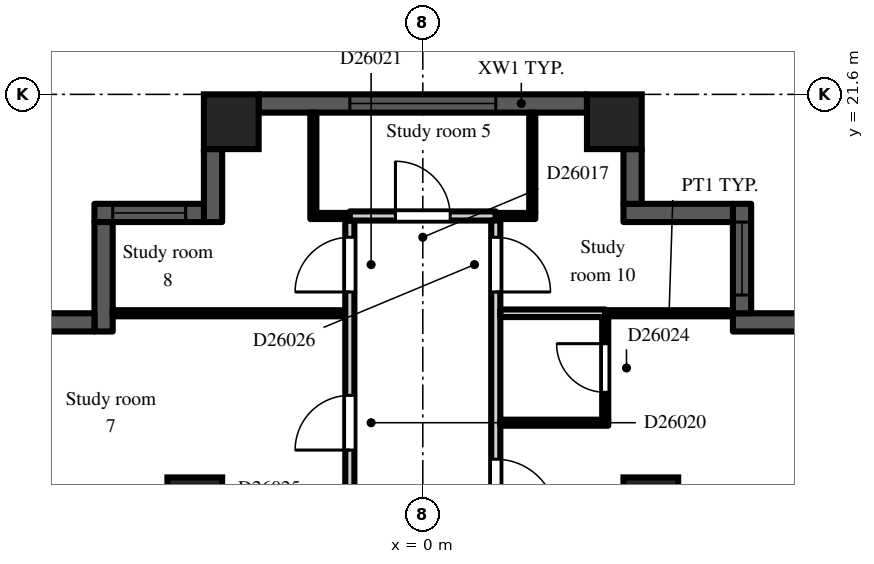
"""IFC4 building model, lengths in metres.
Left out: names, types, materials, properties, quantities, classifications, styles, units other than length and angle.
Written with IfcOpenShell. Run it as: python <this file> out.ifc"""

import sys

from ifc_helpers import new_model, si_unit, direction, frame, frame_2d, origin, origin_2d, place, context, subcontext, project, spatial, rectangle, extrude, element, fill, save


model = new_model("IFC4")
c1 = context("Model", 3, precision=1e-05, world=origin(), true_north=direction((0.0, 1.0)))
c2 = subcontext(c1, "Body", "Model", "MODEL_VIEW")
j1 = project(units=[si_unit("LENGTHUNIT", "METRE"), si_unit("PLANEANGLEUNIT", "RADIAN")], contexts=[c1])
p1 = place(None, origin())
s1 = spatial("IfcSite", under=j1, at=p1, CompositionType="ELEMENT")
p2 = place(p1, origin())
s2 = spatial("IfcBuilding", under=s1, at=p2, CompositionType="ELEMENT")
p3 = place(p2, frame((0.0, 0.0, 179.7)))
s3 = spatial("IfcBuildingStorey", under=s2, at=p3, CompositionType="ELEMENT", Elevation=179.7)
for number, where, z_axis, x_axis in (
    (1, (-3.75, 14.85, 0.0), (0.0, 0.0, 1.0), (1.0, 0.0, 0.0)),
    (2, (-3.15, 21.15, 0.0), (0.0, 0.0, 1.0), (1.0, 0.0, 0.0)),
    (3, (3.15, 21.15, 0.0), (0.0, 0.0, 1.0), (1.0, 0.0, 0.0)),
    (4, (3.75, 14.85, 0.0), (0.0, 0.0, 1.0), (1.0, 0.0, 0.0)),
):
    element("IfcColumn", number, at=place(p3, frame(where, z_axis=z_axis, x_axis=x_axis)), inside=s3, PredefinedType="COLUMN", context=c2, shape_type="SweptSolid", body=[
        extrude(rectangle(XDim=0.9, YDim=0.9, at=origin_2d()), origin(), (0.0, 0.0, 1.0), 3.0),
    ])
p4 = place(p3, frame((6.3, 17.85, 0.0), z_axis=(0.0, 0.0, 1.0), x_axis=(-1.0, 0.0, 0.0)))
e5 = element("IfcWall", 5, at=p4, inside=s3, PredefinedType="SOLIDWALL", context=c2, shape_type="SweptSolid", body=[
    extrude(rectangle(XDim=1.2, YDim=0.3, at=frame_2d((0.6, 0.0))), origin(), (0.0, 0.0, 1.0), 2.6),
])
p5 = place(p3, frame((5.25, 18.0, 0.0), z_axis=(0.0, 0.0, 1.0), x_axis=(0.0, 1.0, 0.0)))
e6 = element("IfcWall", 6, at=p5, inside=s3, PredefinedType="SOLIDWALL", context=c2, shape_type="SweptSolid", body=[
    extrude(rectangle(XDim=1.8, YDim=0.3, at=frame_2d((0.9, 0.0))), origin(), (0.0, 0.0, 1.0), 2.6),
])
p6 = place(p5, frame((0.3, 0.0, 0.2)))
e7 = element("IfcOpeningElement", 7, at=p6, cuts=e6, PredefinedType="OPENING", context=c2, shape_type="SweptSolid", body=[
    extrude(rectangle(XDim=1.2, YDim=1.85, at=frame_2d((0.6, 0.925))), frame((0.0, 0.16, 0.0), z_axis=(0.0, -1.0, 0.0), x_axis=(1.0, 0.0, 0.0)), (0.0, 0.0, 1.0), 0.32),
])
p7 = place(p3, frame((5.1, 19.65, 0.0), z_axis=(0.0, 0.0, 1.0), x_axis=(-1.0, 0.0, 0.0)))
e8 = element("IfcWall", 8, at=p7, inside=s3, PredefinedType="SOLIDWALL", context=c2, shape_type="SweptSolid", body=[
    extrude(rectangle(XDim=1.8, YDim=0.3, at=frame_2d((0.9, 0.0))), origin(), (0.0, 0.0, 1.0), 2.6),
])
p8 = place(p3, frame((3.45, 19.8, 0.0), z_axis=(0.0, 0.0, 1.0), x_axis=(0.0, 1.0, 0.0)))
e9 = element("IfcWall", 9, at=p8, inside=s3, PredefinedType="SOLIDWALL", context=c2, shape_type="SweptSolid", body=[
    extrude(rectangle(XDim=0.9, YDim=0.3, at=frame_2d((0.45, 0.0))), origin(), (0.0, 0.0, 1.0), 2.6),
])
p9 = place(p3, frame((2.7, 21.45, 0.0), z_axis=(0.0, 0.0, 1.0), x_axis=(-1.0, 0.0, 0.0)))
e10 = element("IfcWall", 10, at=p9, inside=s3, PredefinedType="SOLIDWALL", context=c2, shape_type="SweptSolid", body=[
    extrude(rectangle(XDim=5.4, YDim=0.3, at=frame_2d((2.7, 0.0))), origin(), (0.0, 0.0, 1.0), 2.2),
])
p10 = place(p9, frame((1.5, 0.0, 0.2)))
e11 = element("IfcOpeningElement", 11, at=p10, cuts=e10, PredefinedType="OPENING", context=c2, shape_type="SweptSolid", body=[
    extrude(rectangle(XDim=2.4, YDim=1.85, at=frame_2d((1.2, 0.925))), frame((0.0, 0.16, 0.0), z_axis=(0.0, -1.0, 0.0), x_axis=(1.0, 0.0, 0.0)), (0.0, 0.0, 1.0), 0.32),
])
p11 = place(p3, frame((-3.45, 20.7, 0.0), z_axis=(0.0, 0.0, 1.0), x_axis=(0.0, -1.0, 0.0)))
e12 = element("IfcWall", 12, at=p11, inside=s3, PredefinedType="SOLIDWALL", context=c2, shape_type="SweptSolid", body=[
    extrude(rectangle(XDim=1.2, YDim=0.3, at=frame_2d((0.6, 0.0))), origin(), (0.0, 0.0, 1.0), 2.6),
])
p12 = place(p3, frame((-3.6, 19.65, 0.0), z_axis=(0.0, 0.0, 1.0), x_axis=(-1.0, 0.0, 0.0)))
e13 = element("IfcWall", 13, at=p12, inside=s3, PredefinedType="SOLIDWALL", context=c2, shape_type="SweptSolid", body=[
    extrude(rectangle(XDim=1.8, YDim=0.3, at=frame_2d((0.9, 0.0))), origin(), (0.0, 0.0, 1.0), 2.6),
])
p13 = place(p12, frame((0.3, 0.0, 0.2)))
e14 = element("IfcOpeningElement", 14, at=p13, cuts=e13, PredefinedType="OPENING", context=c2, shape_type="SweptSolid", body=[
    extrude(rectangle(XDim=1.2, YDim=1.85, at=frame_2d((0.6, 0.925))), frame((0.0, 0.16, 0.0), z_axis=(0.0, -1.0, 0.0), x_axis=(1.0, 0.0, 0.0)), (0.0, 0.0, 1.0), 0.32),
])
p14 = place(p3, frame((-5.25, 19.5, 0.0), z_axis=(0.0, 0.0, 1.0), x_axis=(0.0, -1.0, 0.0)))
e15 = element("IfcWall", 15, at=p14, inside=s3, PredefinedType="SOLIDWALL", context=c2, shape_type="SweptSolid", body=[
    extrude(rectangle(XDim=1.8, YDim=0.3, at=frame_2d((0.9, 0.0))), origin(), (0.0, 0.0, 1.0), 2.6),
])
p15 = place(p3, frame((-5.4, 17.85, 0.0), z_axis=(0.0, 0.0, 1.0), x_axis=(-1.0, 0.0, 0.0)))
e16 = element("IfcWall", 16, at=p15, inside=s3, PredefinedType="SOLIDWALL", context=c2, shape_type="SweptSolid", body=[
    extrude(rectangle(XDim=0.9, YDim=0.3, at=frame_2d((0.45, 0.0))), origin(), (0.0, 0.0, 1.0), 2.6),
])
p16 = place(p3, frame((-5.1, 18.0, 0.0), z_axis=(0.0, 0.0, 1.0), x_axis=(1.0, 0.0, 0.0)))
e17 = element("IfcWall", 17, at=p16, inside=s3, PredefinedType="PARTITIONING", context=c2, shape_type="SweptSolid", body=[
    extrude(rectangle(XDim=3.825, YDim=0.1, at=frame_2d((1.913, 0.0))), origin(), (0.0, 0.0, 1.0), 2.6),
])
p17 = place(p3, frame((-1.8, 19.55, 0.0), z_axis=(0.0, 0.0, 1.0), x_axis=(0.0, 1.0, 0.0)))
e18 = element("IfcWall", 18, at=p17, inside=s3, PredefinedType="PARTITIONING", context=c2, shape_type="SweptSolid", body=[
    extrude(rectangle(XDim=1.75, YDim=0.1, at=frame_2d((0.875, 0.0))), origin(), (0.0, 0.0, 1.0), 2.6),
])
p18 = place(p3, frame((-1.75, 19.6, 0.0), z_axis=(0.0, 0.0, 1.0), x_axis=(1.0, 0.0, 0.0)))
e19 = element("IfcWall", 19, at=p18, inside=s3, PredefinedType="PARTITIONING", context=c2, shape_type="SweptSolid", body=[
    extrude(rectangle(XDim=0.55, YDim=0.1, at=frame_2d((0.275, 0.0))), origin(), (0.0, 0.0, 1.0), 2.6),
])
p19 = place(p3, frame((-1.2, 1.275, 0.0), z_axis=(0.0, 0.0, 1.0), x_axis=(0.0, 1.0, 0.0)))
e20 = element("IfcWall", 20, at=p19, inside=s3, PredefinedType="PARTITIONING", context=c2, shape_type="SweptSolid", body=[
    extrude(rectangle(XDim=18.25, YDim=0.15, at=frame_2d((9.125, 0.0))), origin(), (0.0, 0.0, 1.0), 2.6),
])
p20 = place(p19, frame((2.475, 0.0, 0.0)))
e21 = element("IfcOpeningElement", 21, at=p20, cuts=e20, PredefinedType="OPENING", context=c2, shape_type="SweptSolid", body=[
    extrude(rectangle(XDim=0.9, YDim=2.1, at=frame_2d((0.45, 1.05))), frame((0.0, 0.085, 0.0), z_axis=(0.0, -1.0, 0.0), x_axis=(1.0, 0.0, 0.0)), (0.0, 0.0, 1.0), 0.17),
])
p21 = place(p19, frame((11.275, 0.0, 0.0)))
e22 = element("IfcOpeningElement", 22, at=p21, cuts=e20, PredefinedType="OPENING", context=c2, shape_type="SweptSolid", body=[
    extrude(rectangle(XDim=0.9, YDim=2.1, at=frame_2d((0.45, 1.05))), frame((0.0, 0.085, 0.0), z_axis=(0.0, -1.0, 0.0), x_axis=(1.0, 0.0, 0.0)), (0.0, 0.0, 1.0), 0.17),
])
p22 = place(p19, frame((7.675, 0.0, 0.0)))
e23 = element("IfcOpeningElement", 23, at=p22, cuts=e20, PredefinedType="OPENING", context=c2, shape_type="SweptSolid", body=[
    extrude(rectangle(XDim=0.9, YDim=2.1, at=frame_2d((0.45, 1.05))), frame((0.0, 0.085, 0.0), z_axis=(0.0, -1.0, 0.0), x_axis=(1.0, 0.0, 0.0)), (0.0, 0.0, 1.0), 0.17),
])
p23 = place(p19, frame((14.475, 0.0, 0.0)))
e24 = element("IfcOpeningElement", 24, at=p23, cuts=e20, PredefinedType="OPENING", context=c2, shape_type="SweptSolid", body=[
    extrude(rectangle(XDim=0.9, YDim=2.1, at=frame_2d((0.45, 1.05))), frame((0.0, 0.085, 0.0), z_axis=(0.0, -1.0, 0.0), x_axis=(1.0, 0.0, 0.0)), (0.0, 0.0, 1.0), 0.17),
])
p24 = place(p19, frame((17.075, 0.0, 0.0)))
e25 = element("IfcOpeningElement", 25, at=p24, cuts=e20, PredefinedType="OPENING", context=c2, shape_type="SweptSolid", body=[
    extrude(rectangle(XDim=0.9, YDim=2.1, at=frame_2d((0.45, 1.05))), frame((0.0, 0.085, 0.0), z_axis=(0.0, -1.0, 0.0), x_axis=(1.0, 0.0, 0.0)), (0.0, 0.0, 1.0), 0.17),
])
p25 = place(p3, frame((-1.2, 19.6, 0.0), z_axis=(0.0, 0.0, 1.0), x_axis=(1.0, 0.0, 0.0)))
e26 = element("IfcWall", 26, at=p25, inside=s3, PredefinedType="PARTITIONING", context=c2, shape_type="SweptSolid", body=[
    extrude(rectangle(XDim=2.4, YDim=0.15, at=frame_2d((1.2, 0.0))), origin(), (0.0, 0.0, 1.0), 2.6),
])
p26 = place(p25, frame((0.75, 0.0, 0.0)))
e27 = element("IfcOpeningElement", 27, at=p26, cuts=e26, PredefinedType="OPENING", context=c2, shape_type="SweptSolid", body=[
    extrude(rectangle(XDim=0.9, YDim=2.1, at=frame_2d((0.45, 1.05))), frame((0.0, 0.085, 0.0), z_axis=(0.0, -1.0, 0.0), x_axis=(1.0, 0.0, 0.0)), (0.0, 0.0, 1.0), 0.17),
])
p27 = place(p3, frame((1.2, 1.125, 0.0), z_axis=(0.0, 0.0, 1.0), x_axis=(0.0, 1.0, 0.0)))
e28 = element("IfcWall", 28, at=p27, inside=s3, PredefinedType="PARTITIONING", context=c2, shape_type="SweptSolid", body=[
    extrude(rectangle(XDim=18.4, YDim=0.15, at=frame_2d((9.2, 0.0))), origin(), (0.0, 0.0, 1.0), 2.6),
])
p28 = place(p27, frame((3.825, 0.0, 0.0)))
e29 = element("IfcOpeningElement", 29, at=p28, cuts=e28, PredefinedType="OPENING", context=c2, shape_type="SweptSolid", body=[
    extrude(rectangle(XDim=0.9, YDim=2.1, at=frame_2d((0.45, 1.05))), frame((0.0, 0.085, 0.0), z_axis=(0.0, -1.0, 0.0), x_axis=(1.0, 0.0, 0.0)), (0.0, 0.0, 1.0), 0.17),
])
p29 = place(p27, frame((11.425, 0.0, 0.0)))
e30 = element("IfcOpeningElement", 30, at=p29, cuts=e28, PredefinedType="OPENING", context=c2, shape_type="SweptSolid", body=[
    extrude(rectangle(XDim=0.9, YDim=2.1, at=frame_2d((0.45, 1.05))), frame((0.0, 0.085, 0.0), z_axis=(0.0, -1.0, 0.0), x_axis=(1.0, 0.0, 0.0)), (0.0, 0.0, 1.0), 0.17),
])
p30 = place(p27, frame((7.825, 0.0, 0.0)))
e31 = element("IfcOpeningElement", 31, at=p30, cuts=e28, PredefinedType="OPENING", context=c2, shape_type="SweptSolid", body=[
    extrude(rectangle(XDim=0.9, YDim=2.1, at=frame_2d((0.45, 1.05))), frame((0.0, 0.085, 0.0), z_axis=(0.0, -1.0, 0.0), x_axis=(1.0, 0.0, 0.0)), (0.0, 0.0, 1.0), 0.17),
])
p31 = place(p27, frame((13.475, 0.0, 0.0)))
e32 = element("IfcOpeningElement", 32, at=p31, cuts=e28, PredefinedType="OPENING", context=c2, shape_type="SweptSolid", body=[
    extrude(rectangle(XDim=1.0, YDim=2.1, at=frame_2d((0.5, 1.05))), frame((0.0, 0.085, 0.0), z_axis=(0.0, -1.0, 0.0), x_axis=(1.0, 0.0, 0.0)), (0.0, 0.0, 1.0), 0.17),
])
p32 = place(p27, frame((17.225, 0.0, 0.0)))
e33 = element("IfcOpeningElement", 33, at=p32, cuts=e28, PredefinedType="OPENING", context=c2, shape_type="SweptSolid", body=[
    extrude(rectangle(XDim=0.9, YDim=2.1, at=frame_2d((0.45, 1.05))), frame((0.0, 0.085, 0.0), z_axis=(0.0, -1.0, 0.0), x_axis=(1.0, 0.0, 0.0)), (0.0, 0.0, 1.0), 0.17),
])
p33 = place(p3, frame((1.275, 16.2, 0.0), z_axis=(0.0, 0.0, 1.0), x_axis=(1.0, 0.0, 0.0)))
e34 = element("IfcWall", 34, at=p33, inside=s3, PredefinedType="PARTITIONING", context=c2, shape_type="SweptSolid", body=[
    extrude(rectangle(XDim=1.775, YDim=0.1, at=frame_2d((0.888, 0.0))), origin(), (0.0, 0.0, 1.0), 2.6),
])
p34 = place(p3, frame((1.275, 18.0, 0.0), z_axis=(0.0, 0.0, 1.0), x_axis=(1.0, 0.0, 0.0)))
e35 = element("IfcWall", 35, at=p34, inside=s3, PredefinedType="PARTITIONING", context=c2, shape_type="SweptSolid", body=[
    extrude(rectangle(XDim=1.725, YDim=0.125, at=frame_2d((0.863, 0.0))), origin(), (0.0, 0.0, 1.0), 2.6),
])
p35 = place(p3, frame((1.2, 19.6, 0.0), z_axis=(0.0, 0.0, 1.0), x_axis=(1.0, 0.0, 0.0)))
e36 = element("IfcWall", 36, at=p35, inside=s3, PredefinedType="PARTITIONING", context=c2, shape_type="SweptSolid", body=[
    extrude(rectangle(XDim=0.65, YDim=0.1, at=frame_2d((0.325, 0.0))), origin(), (0.0, 0.0, 1.0), 2.6),
])
p36 = place(p3, frame((1.8, 19.65, 0.0), z_axis=(0.0, 0.0, 1.0), x_axis=(0.0, 1.0, 0.0)))
e37 = element("IfcWall", 37, at=p36, inside=s3, PredefinedType="PARTITIONING", context=c2, shape_type="SweptSolid", body=[
    extrude(rectangle(XDim=1.65, YDim=0.1, at=frame_2d((0.825, 0.0))), origin(), (0.0, 0.0, 1.0), 2.6),
])
p37 = place(p3, frame((3.0, 16.25, 0.0), z_axis=(0.0, 0.0, 1.0), x_axis=(0.0, 1.0, 0.0)))
e38 = element("IfcWall", 38, at=p37, inside=s3, PredefinedType="PARTITIONING", context=c2, shape_type="SweptSolid", body=[
    extrude(rectangle(XDim=1.688, YDim=0.1, at=frame_2d((0.844, 0.0))), origin(), (0.0, 0.0, 1.0), 2.6),
])
p38 = place(p37, frame((0.45, 0.0, 0.0)))
e39 = element("IfcOpeningElement", 39, at=p38, cuts=e38, PredefinedType="OPENING", context=c2, shape_type="SweptSolid", body=[
    extrude(rectangle(XDim=0.8, YDim=2.1, at=frame_2d((0.4, 1.05))), frame((0.0, 0.06, 0.0), z_axis=(0.0, -1.0, 0.0), x_axis=(1.0, 0.0, 0.0)), (0.0, 0.0, 1.0), 0.12),
])
p39 = place(p3, frame((3.0, 18.0, 0.0), z_axis=(0.0, 0.0, 1.0), x_axis=(1.0, 0.0, 0.0)))
e40 = element("IfcWall", 40, at=p39, inside=s3, PredefinedType="PARTITIONING", context=c2, shape_type="SweptSolid", body=[
    extrude(rectangle(XDim=2.1, YDim=0.1, at=frame_2d((1.05, 0.0))), origin(), (0.0, 0.0, 1.0), 2.6),
])
p40 = place(p6, origin())
e41 = element("IfcWindow", 41, at=p40, inside=s3, PartitioningType="SINGLE_PANEL", PredefinedType="WINDOW", context=c2, shape_type="SweptSolid", body=[
    extrude(rectangle(XDim=1.2, YDim=1.85, at=frame_2d((0.6, 0.925))), frame((0.0, 0.03, 0.0), z_axis=(0.0, -1.0, 0.0), x_axis=(1.0, 0.0, 0.0)), (0.0, 0.0, 1.0), 0.06),
])
fill(e7, e41)
p41 = place(p10, origin())
e42 = element("IfcWindow", 42, at=p41, inside=s3, PartitioningType="SINGLE_PANEL", PredefinedType="WINDOW", context=c2, shape_type="SweptSolid", body=[
    extrude(rectangle(XDim=2.4, YDim=1.85, at=frame_2d((1.2, 0.925))), frame((0.0, 0.03, 0.0), z_axis=(0.0, -1.0, 0.0), x_axis=(1.0, 0.0, 0.0)), (0.0, 0.0, 1.0), 0.06),
])
fill(e11, e42)
p42 = place(p13, origin())
e43 = element("IfcWindow", 43, at=p42, inside=s3, PartitioningType="SINGLE_PANEL", PredefinedType="WINDOW", context=c2, shape_type="SweptSolid", body=[
    extrude(rectangle(XDim=1.2, YDim=1.85, at=frame_2d((0.6, 0.925))), frame((0.0, 0.03, 0.0), z_axis=(0.0, -1.0, 0.0), x_axis=(1.0, 0.0, 0.0)), (0.0, 0.0, 1.0), 0.06),
])
fill(e14, e43)
p43 = place(p26, origin())
e44 = element("IfcDoor", 44, at=p43, inside=s3, OperationType="SINGLE_SWING_LEFT", PredefinedType="DOOR", context=c2, shape_type="SweptSolid", body=[
    extrude(rectangle(XDim=0.9, YDim=2.1, at=frame_2d((0.45, 1.05))), frame((0.0, 0.025, 0.0), z_axis=(0.0, -1.0, 0.0), x_axis=(1.0, 0.0, 0.0)), (0.0, 0.0, 1.0), 0.05),
])
fill(e27, e44)
p44 = place(p23, origin())
e45 = element("IfcDoor", 45, at=p44, inside=s3, OperationType="SINGLE_SWING_LEFT", PredefinedType="DOOR", context=c2, shape_type="SweptSolid", body=[
    extrude(rectangle(XDim=0.9, YDim=2.1, at=frame_2d((0.45, 1.05))), frame((0.0, 0.025, 0.0), z_axis=(0.0, -1.0, 0.0), x_axis=(1.0, 0.0, 0.0)), (0.0, 0.0, 1.0), 0.05),
])
fill(e24, e45)
p45 = place(p24, origin())
e46 = element("IfcDoor", 46, at=p45, inside=s3, OperationType="SINGLE_SWING_LEFT", PredefinedType="DOOR", context=c2, shape_type="SweptSolid", body=[
    extrude(rectangle(XDim=0.9, YDim=2.1, at=frame_2d((0.45, 1.05))), frame((0.0, 0.025, 0.0), z_axis=(0.0, -1.0, 0.0), x_axis=(1.0, 0.0, 0.0)), (0.0, 0.0, 1.0), 0.05),
])
fill(e25, e46)
p46 = place(p38, origin())
e47 = element("IfcDoor", 47, at=p46, inside=s3, OperationType="SINGLE_SWING_RIGHT", PredefinedType="DOOR", context=c2, shape_type="SweptSolid", body=[
    extrude(rectangle(XDim=0.8, YDim=2.1, at=frame_2d((0.4, 1.05))), frame((0.0, 0.025, 0.0), z_axis=(0.0, -1.0, 0.0), x_axis=(1.0, 0.0, 0.0)), (0.0, 0.0, 1.0), 0.05),
])
fill(e39, e47)
p47 = place(p31, frame((1.0, 0.0, 0.0), z_axis=(0.0, 0.0, 1.0), x_axis=(-1.0, 0.0, 0.0)))
e48 = element("IfcDoor", 48, at=p47, inside=s3, OperationType="SINGLE_SWING_RIGHT", PredefinedType="DOOR", context=c2, shape_type="SweptSolid", body=[
    extrude(rectangle(XDim=1.0, YDim=2.1, at=frame_2d((0.5, 1.05))), frame((0.0, 0.025, 0.0), z_axis=(0.0, -1.0, 0.0), x_axis=(1.0, 0.0, 0.0)), (0.0, 0.0, 1.0), 0.05),
])
fill(e32, e48)
p48 = place(p32, frame((0.9, 0.0, 0.0), z_axis=(0.0, 0.0, 1.0), x_axis=(-1.0, 0.0, 0.0)))
e49 = element("IfcDoor", 49, at=p48, inside=s3, OperationType="SINGLE_SWING_RIGHT", PredefinedType="DOOR", context=c2, shape_type="SweptSolid", body=[
    extrude(rectangle(XDim=0.9, YDim=2.1, at=frame_2d((0.45, 1.05))), frame((0.0, 0.025, 0.0), z_axis=(0.0, -1.0, 0.0), x_axis=(1.0, 0.0, 0.0)), (0.0, 0.0, 1.0), 0.05),
])
fill(e33, e49)
save(model, sys.argv[1])
